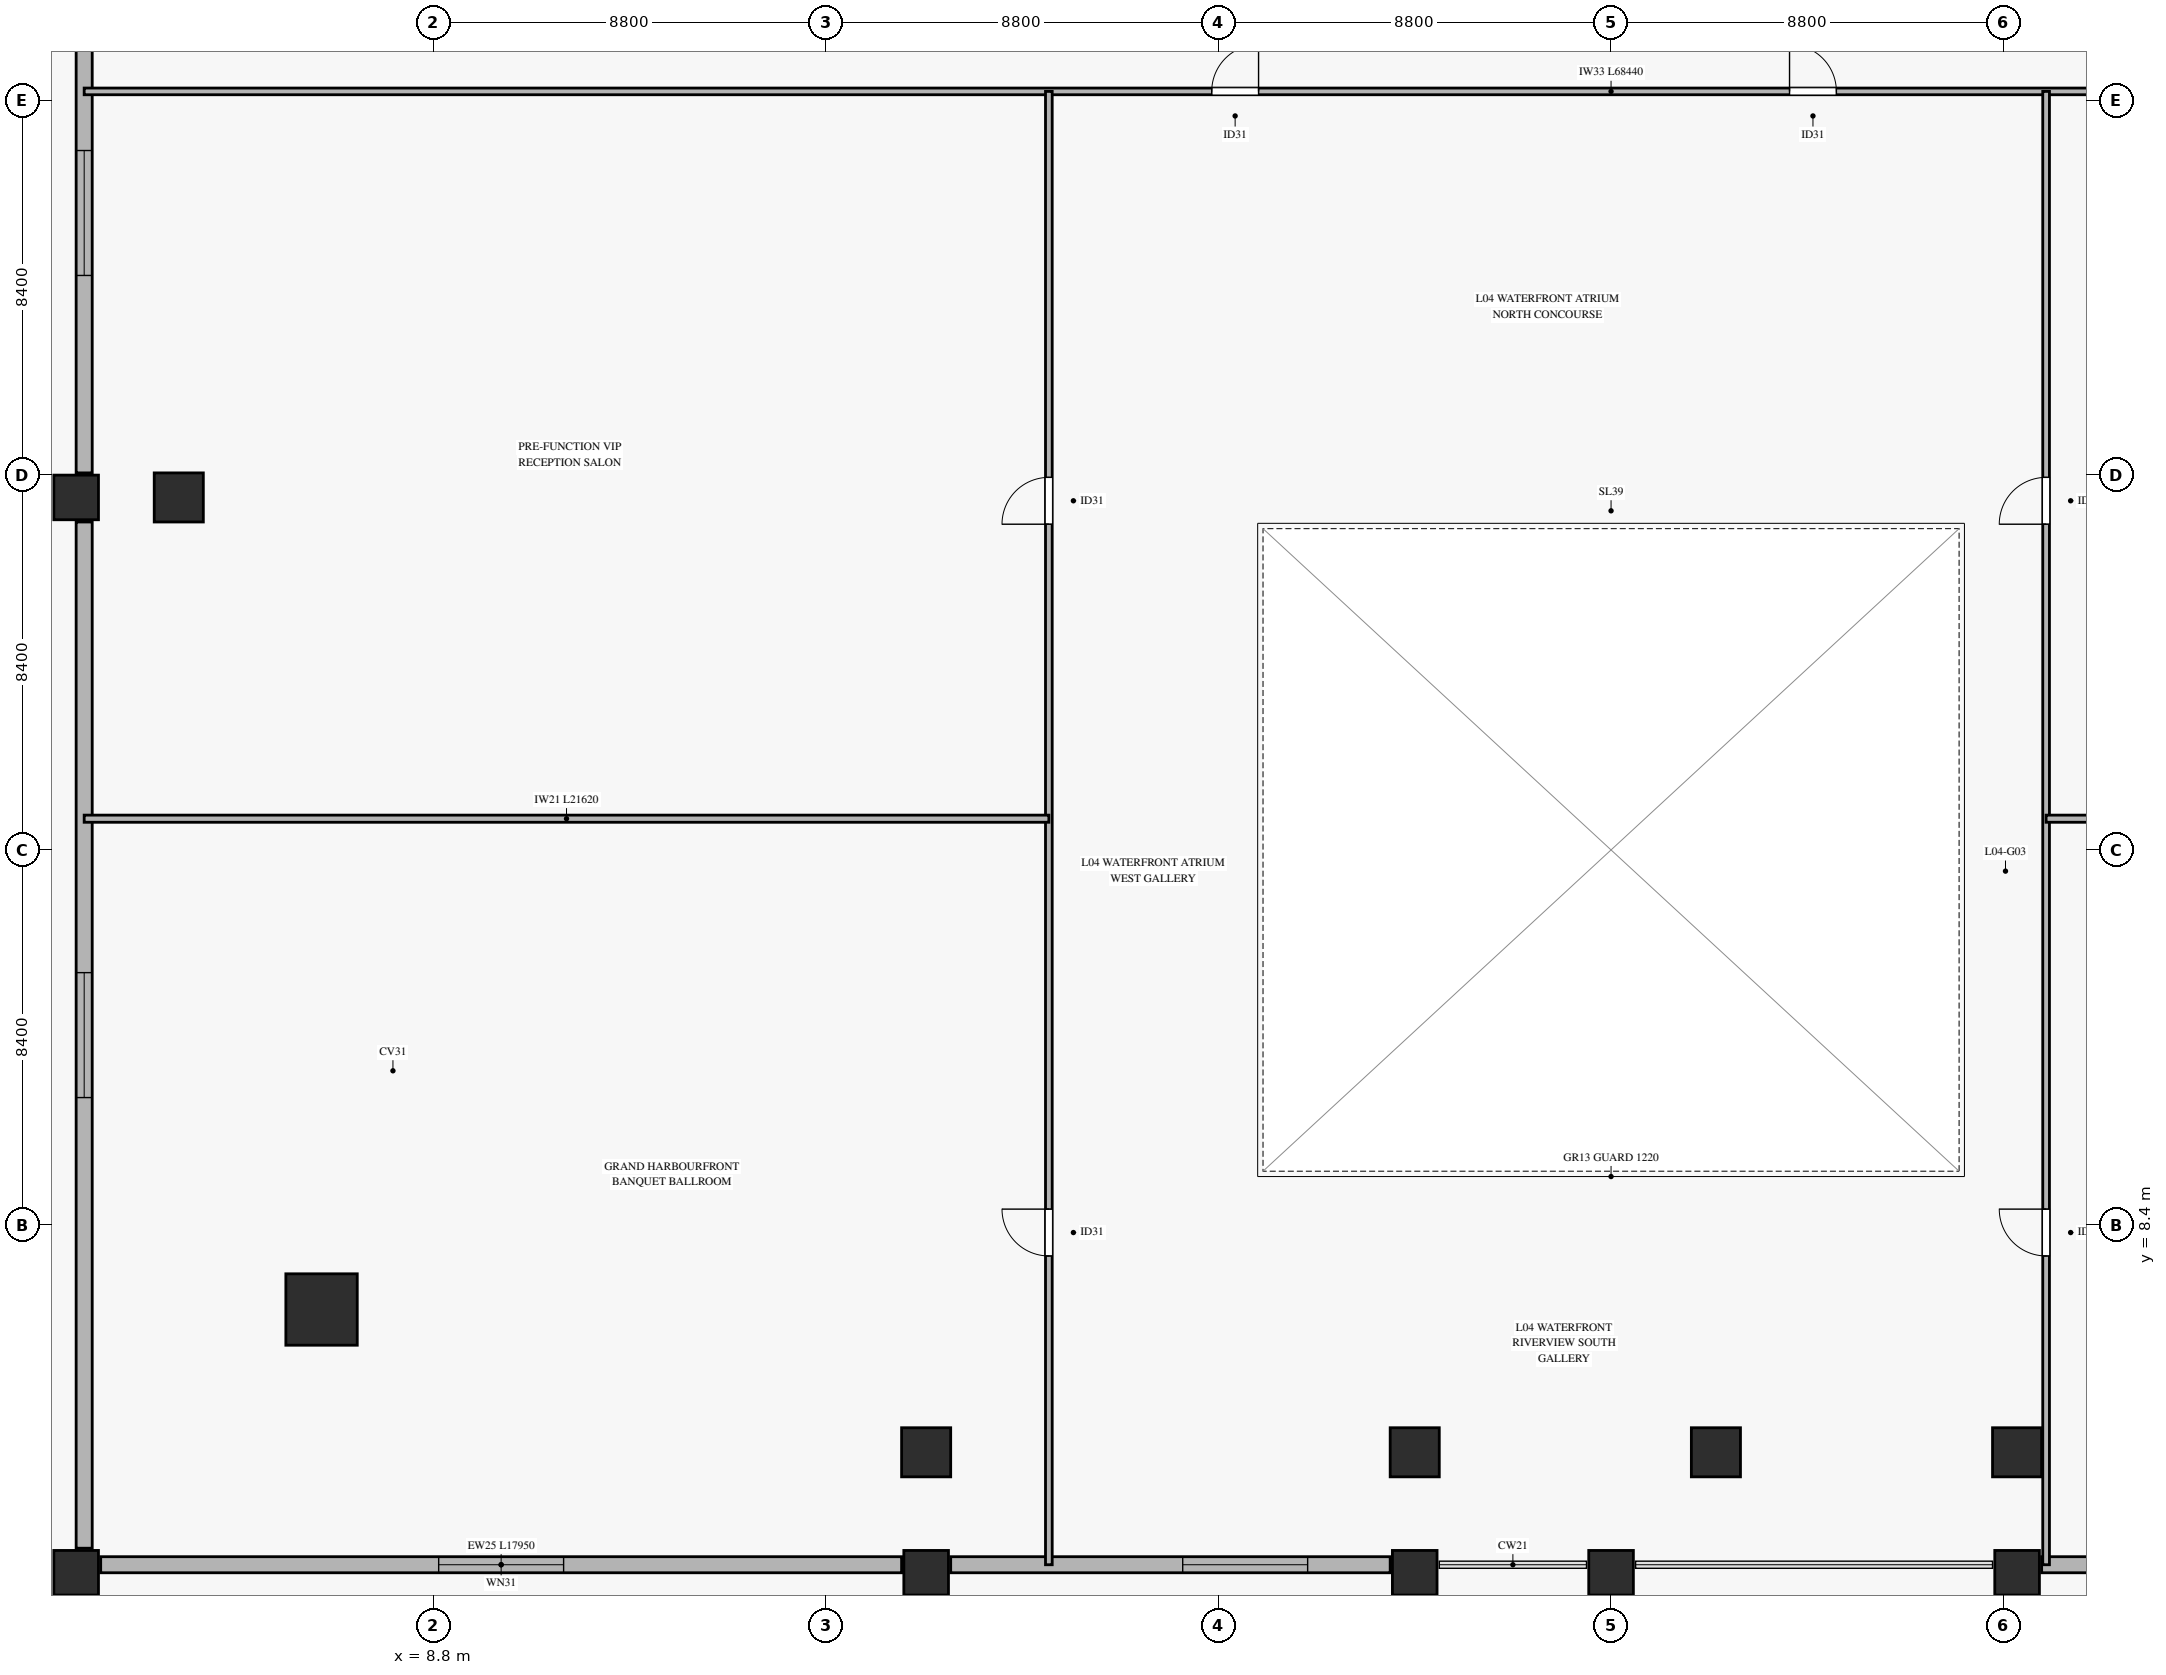
"""IFC4 building model, lengths in metres.
Left out: names, types, materials, properties, quantities, classifications, styles, units other than length and angle.
Written with IfcOpenShell. Run it as: python <this file> out.ifc"""

import sys

from ifc_helpers import new_model, si_unit, direction, frame, frame_2d, origin, origin_2d, place, context, subcontext, project, spatial, rectangle, hollow_rectangle, extrude, source, transform, mapped, element, fill, save


model = new_model("IFC4")
c1 = context("Model", 3, precision=1e-05, world=origin(), true_north=direction((0.0, 1.0)))
c2 = subcontext(c1, "Body", "Model", "MODEL_VIEW")
j1 = project(units=[si_unit("LENGTHUNIT", "METRE"), si_unit("PLANEANGLEUNIT", "RADIAN")], contexts=[c1])
p1 = place(None, origin())
s1 = spatial("IfcSite", under=j1, at=p1, CompositionType="ELEMENT")
p2 = place(p1, origin())
s2 = spatial("IfcBuilding", under=s1, at=p2, CompositionType="ELEMENT")
p3 = place(p2, frame((0.0, 0.0, 15.2)))
s3 = spatial("IfcBuildingStorey", under=s2, at=p3, CompositionType="ELEMENT", Elevation=15.2)
m1 = source(origin(), c2, "Body", "SweptSolid", [
    extrude(hollow_rectangle(XDim=1.6, YDim=1.6, WallThickness=0.075, at=origin_2d()), origin(), (0.0, 0.0, 1.0), 4.65),
])
p4 = place(p3, frame((6.3, 6.5, 0.0), z_axis=(0.0, 0.0, 1.0), x_axis=(1.0, 0.0, 0.0)))
e1 = element("IfcColumn", 1, at=p4, inside=s3, PredefinedType="COLUMN", context=c2, shape_type="MappedRepresentation", body=[
    mapped(m1, transform((0.0, 0.0, 0.0), x_axis=(1.0, 0.0, 0.0), y_axis=(0.0, 1.0, 0.0), z_axis=(0.0, 0.0, 1.0), scale=1.0)),
])
m2 = source(origin(), c2, "Body", "SweptSolid", [
    extrude(hollow_rectangle(XDim=1.1, YDim=1.1, WallThickness=0.05, at=origin_2d()), origin(), (0.0, 0.0, 1.0), 4.65),
])
for number, where, z_axis, x_axis in (
    (2, (19.85, 3.3, 0.0), (0.0, 0.0, 1.0), (1.0, 0.0, 0.0)),
    (3, (30.8, 3.3, 0.0), (0.0, 0.0, 1.0), (1.0, 0.0, 0.0)),
    (4, (37.55, 3.3, 0.0), (0.0, 0.0, 1.0), (1.0, 0.0, 0.0)),
    (5, (44.3, 3.3, 0.0), (0.0, 0.0, 1.0), (1.0, 0.0, 0.0)),
    (6, (3.1, 24.7, 0.0), (0.0, 0.0, 1.0), (1.0, 0.0, 0.0)),
):
    element("IfcColumn", number, at=place(p3, frame(where, z_axis=z_axis, x_axis=x_axis)), inside=s3, PredefinedType="COLUMN", context=c2, shape_type="MappedRepresentation", body=[
        mapped(m2, transform((0.0, 0.0, 0.0), x_axis=(1.0, 0.0, 0.0), y_axis=(0.0, 1.0, 0.0), z_axis=(0.0, 0.0, 1.0), scale=1.0)),
    ])
m3 = source(origin(), c2, "Body", "SweptSolid", [
    extrude(hollow_rectangle(XDim=1.0, YDim=1.0, WallThickness=0.045, at=origin_2d()), origin(), (0.0, 0.0, 1.0), 4.65),
])
for number, where, z_axis, x_axis in (
    (7, (0.8, 0.6, 0.0), (0.0, 0.0, 1.0), (1.0, 0.0, 0.0)),
    (8, (19.85, 0.6, 0.0), (0.0, 0.0, 1.0), (1.0, 0.0, 0.0)),
    (9, (30.8, 0.6, 0.0), (0.0, 0.0, 1.0), (1.0, 0.0, 0.0)),
    (10, (35.2, 0.6, 0.0), (0.0, 0.0, 1.0), (1.0, 0.0, 0.0)),
    (11, (44.3, 0.6, 0.0), (0.0, 0.0, 1.0), (1.0, 0.0, 0.0)),
    (12, (0.8, 24.7, 0.0), (0.0, 0.0, 1.0), (1.0, 0.0, 0.0)),
):
    element("IfcColumn", number, at=place(p3, frame(where, z_axis=z_axis, x_axis=x_axis)), inside=s3, PredefinedType="COLUMN", context=c2, shape_type="MappedRepresentation", body=[
        mapped(m3, transform((0.0, 0.0, 0.0), x_axis=(1.0, 0.0, 0.0), y_axis=(0.0, 1.0, 0.0), z_axis=(0.0, 0.0, 1.0), scale=1.0)),
    ])
p5 = place(p3, frame((1.35, 0.78, 0.0), z_axis=(0.0, 0.0, 1.0), x_axis=(1.0, 0.0, 0.0)))
e13 = element("IfcWall", 13, at=p5, inside=s3, PredefinedType="SOLIDWALL", context=c2, shape_type="SweptSolid", body=[
    extrude(rectangle(XDim=17.95, YDim=0.36, at=frame_2d((8.975, 0.0))), origin(), (0.0, 0.0, 1.0), 3.53),
])
p6 = place(p5, frame((7.575, 0.0, 0.72)))
e14 = element("IfcOpeningElement", 14, at=p6, cuts=e13, PredefinedType="OPENING", context=c2, shape_type="SweptSolid", body=[
    extrude(rectangle(XDim=2.8, YDim=2.0, at=frame_2d((1.4, 1.0))), frame((0.0, 0.19, 0.0), z_axis=(0.0, -1.0, 0.0), x_axis=(1.0, 0.0, 0.0)), (0.0, 0.0, 1.0), 0.38),
])
p7 = place(p3, frame((20.4, 0.78, 0.0), z_axis=(0.0, 0.0, 1.0), x_axis=(1.0, 0.0, 0.0)))
e15 = element("IfcWall", 15, at=p7, inside=s3, PredefinedType="SOLIDWALL", context=c2, shape_type="SweptSolid", body=[
    extrude(rectangle(XDim=9.85, YDim=0.36, at=frame_2d((4.925, 0.0))), origin(), (0.0, 0.0, 1.0), 3.53),
])
p8 = place(p7, frame((5.2, 0.0, 0.72)))
e16 = element("IfcOpeningElement", 16, at=p8, cuts=e15, PredefinedType="OPENING", context=c2, shape_type="SweptSolid", body=[
    extrude(rectangle(XDim=2.8, YDim=2.0, at=frame_2d((1.4, 1.0))), frame((0.0, 0.19, 0.0), z_axis=(0.0, -1.0, 0.0), x_axis=(1.0, 0.0, 0.0)), (0.0, 0.0, 1.0), 0.38),
])
p9 = place(p3, frame((44.85, 0.78, 0.0), z_axis=(0.0, 0.0, 1.0), x_axis=(1.0, 0.0, 0.0)))
e17 = element("IfcWall", 17, at=p9, inside=s3, PredefinedType="SOLIDWALL", context=c2, shape_type="SweptSolid", body=[
    extrude(rectangle(XDim=5.15, YDim=0.36, at=frame_2d((2.575, 0.0))), origin(), (0.0, 0.0, 1.0), 3.53),
])
p10 = place(p9, frame((1.5, 0.0, 0.72)))
e18 = element("IfcOpeningElement", 18, at=p10, cuts=e17, PredefinedType="OPENING", context=c2, shape_type="SweptSolid", body=[
    extrude(rectangle(XDim=2.8, YDim=2.0, at=frame_2d((1.4, 1.0))), frame((0.0, 0.19, 0.0), z_axis=(0.0, -1.0, 0.0), x_axis=(1.0, 0.0, 0.0)), (0.0, 0.0, 1.0), 0.38),
])
p11 = place(p3, frame((0.98, 1.15, 0.0), z_axis=(0.0, 0.0, 1.0), x_axis=(0.0, 1.0, 0.0)))
e19 = element("IfcWall", 19, at=p11, inside=s3, PredefinedType="SOLIDWALL", context=c2, shape_type="SweptSolid", body=[
    extrude(rectangle(XDim=23.0, YDim=0.36, at=frame_2d((11.5, 0.0))), origin(), (0.0, 0.0, 1.0), 3.53),
])
p12 = place(p11, frame((10.1, 0.0, 0.72)))
e20 = element("IfcOpeningElement", 20, at=p12, cuts=e19, PredefinedType="OPENING", context=c2, shape_type="SweptSolid", body=[
    extrude(rectangle(XDim=2.8, YDim=2.0, at=frame_2d((1.4, 1.0))), frame((0.0, 0.19, 0.0), z_axis=(0.0, -1.0, 0.0), x_axis=(1.0, 0.0, 0.0)), (0.0, 0.0, 1.0), 0.38),
])
p13 = place(p3, frame((0.98, 25.25, 0.0), z_axis=(0.0, 0.0, 1.0), x_axis=(0.0, 1.0, 0.0)))
e21 = element("IfcWall", 21, at=p13, inside=s3, PredefinedType="SOLIDWALL", context=c2, shape_type="SweptSolid", body=[
    extrude(rectangle(XDim=11.65, YDim=0.36, at=frame_2d((5.825, 0.0))), origin(), (0.0, 0.0, 1.0), 3.53),
])
p14 = place(p13, frame((4.425, 0.0, 0.72)))
e22 = element("IfcOpeningElement", 22, at=p14, cuts=e21, PredefinedType="OPENING", context=c2, shape_type="SweptSolid", body=[
    extrude(rectangle(XDim=2.8, YDim=2.0, at=frame_2d((1.4, 1.0))), frame((0.0, 0.19, 0.0), z_axis=(0.0, -1.0, 0.0), x_axis=(1.0, 0.0, 0.0)), (0.0, 0.0, 1.0), 0.38),
])
p15 = place(p3, frame((0.98, 33.8, 0.0), z_axis=(0.0, 0.0, 1.0), x_axis=(1.0, 0.0, 0.0)))
e23 = element("IfcWall", 23, at=p15, inside=s3, PredefinedType="PARTITIONING", context=c2, shape_type="SweptSolid", body=[
    extrude(rectangle(XDim=68.44, YDim=0.15, at=frame_2d((34.22, 0.0))), origin(), (0.0, 0.0, 1.0), 3.535),
])
p16 = place(p15, frame((25.27, 0.0, 0.0)))
e24 = element("IfcOpeningElement", 24, at=p16, cuts=e23, PredefinedType="OPENING", context=c2, shape_type="SweptSolid", body=[
    extrude(rectangle(XDim=1.05, YDim=2.15, at=frame_2d((0.525, 1.075))), frame((0.0, 0.085, 0.0), z_axis=(0.0, -1.0, 0.0), x_axis=(1.0, 0.0, 0.0)), (0.0, 0.0, 1.0), 0.17),
])
p17 = place(p15, frame((38.22, 0.0, 0.0)))
e25 = element("IfcOpeningElement", 25, at=p17, cuts=e23, PredefinedType="OPENING", context=c2, shape_type="SweptSolid", body=[
    extrude(rectangle(XDim=1.05, YDim=2.15, at=frame_2d((0.525, 1.075))), frame((0.0, 0.085, 0.0), z_axis=(0.0, -1.0, 0.0), x_axis=(1.0, 0.0, 0.0)), (0.0, 0.0, 1.0), 0.17),
])
p18 = place(p3, frame((22.6, 0.78, 0.0), z_axis=(0.0, 0.0, 1.0), x_axis=(0.0, 1.0, 0.0)))
e26 = element("IfcWall", 26, at=p18, inside=s3, PredefinedType="PARTITIONING", context=c2, shape_type="SweptSolid", body=[
    extrude(rectangle(XDim=33.02, YDim=0.15, at=frame_2d((16.51, 0.0))), origin(), (0.0, 0.0, 1.0), 3.535),
])
p19 = place(p18, frame((6.92, 0.0, 0.0)))
e27 = element("IfcOpeningElement", 27, at=p19, cuts=e26, PredefinedType="OPENING", context=c2, shape_type="SweptSolid", body=[
    extrude(rectangle(XDim=1.05, YDim=2.15, at=frame_2d((0.525, 1.075))), frame((0.0, 0.085, 0.0), z_axis=(0.0, -1.0, 0.0), x_axis=(1.0, 0.0, 0.0)), (0.0, 0.0, 1.0), 0.17),
])
p20 = place(p18, frame((23.32, 0.0, 0.0)))
e28 = element("IfcOpeningElement", 28, at=p20, cuts=e26, PredefinedType="OPENING", context=c2, shape_type="SweptSolid", body=[
    extrude(rectangle(XDim=1.05, YDim=2.15, at=frame_2d((0.525, 1.075))), frame((0.0, 0.085, 0.0), z_axis=(0.0, -1.0, 0.0), x_axis=(1.0, 0.0, 0.0)), (0.0, 0.0, 1.0), 0.17),
])
p21 = place(p3, frame((44.95, 0.78, 0.0), z_axis=(0.0, 0.0, 1.0), x_axis=(0.0, 1.0, 0.0)))
e29 = element("IfcWall", 29, at=p21, inside=s3, PredefinedType="PARTITIONING", context=c2, shape_type="SweptSolid", body=[
    extrude(rectangle(XDim=33.02, YDim=0.15, at=frame_2d((16.51, 0.0))), origin(), (0.0, 0.0, 1.0), 3.535),
])
p22 = place(p21, frame((6.92, 0.0, 0.0)))
e30 = element("IfcOpeningElement", 30, at=p22, cuts=e29, PredefinedType="OPENING", context=c2, shape_type="SweptSolid", body=[
    extrude(rectangle(XDim=1.05, YDim=2.15, at=frame_2d((0.525, 1.075))), frame((0.0, 0.085, 0.0), z_axis=(0.0, -1.0, 0.0), x_axis=(1.0, 0.0, 0.0)), (0.0, 0.0, 1.0), 0.17),
])
p23 = place(p21, frame((23.32, 0.0, 0.0)))
e31 = element("IfcOpeningElement", 31, at=p23, cuts=e29, PredefinedType="OPENING", context=c2, shape_type="SweptSolid", body=[
    extrude(rectangle(XDim=1.05, YDim=2.15, at=frame_2d((0.525, 1.075))), frame((0.0, 0.085, 0.0), z_axis=(0.0, -1.0, 0.0), x_axis=(1.0, 0.0, 0.0)), (0.0, 0.0, 1.0), 0.17),
])
p24 = place(p3, frame((0.98, 17.5, 0.0), z_axis=(0.0, 0.0, 1.0), x_axis=(1.0, 0.0, 0.0)))
e32 = element("IfcWall", 32, at=p24, inside=s3, PredefinedType="PARTITIONING", context=c2, shape_type="SweptSolid", body=[
    extrude(rectangle(XDim=21.62, YDim=0.16, at=frame_2d((10.81, 0.0))), origin(), (0.0, 0.0, 1.0), 3.535),
])
p25 = place(p3, frame((44.95, 17.5, 0.0), z_axis=(0.0, 0.0, 1.0), x_axis=(1.0, 0.0, 0.0)))
e33 = element("IfcWall", 33, at=p25, inside=s3, PredefinedType="PARTITIONING", context=c2, shape_type="SweptSolid", body=[
    extrude(rectangle(XDim=24.47, YDim=0.16, at=frame_2d((12.235, 0.0))), origin(), (0.0, 0.0, 1.0), 3.535),
])
m4 = source(origin(), c2, "Body", "SweptSolid", [
    extrude(rectangle(XDim=2.8, YDim=2.0, at=frame_2d((1.4, 1.0))), frame((0.0, 0.03, 0.0), z_axis=(0.0, -1.0, 0.0), x_axis=(1.0, 0.0, 0.0)), (0.0, 0.0, 1.0), 0.06),
])
p26 = place(p6, origin())
e34 = element("IfcWindow", 34, at=p26, inside=s3, PartitioningType="SINGLE_PANEL", PredefinedType="WINDOW", context=c2, shape_type="MappedRepresentation", body=[
    mapped(m4, transform((0.0, 0.0, 0.0), x_axis=(1.0, 0.0, 0.0), y_axis=(0.0, 1.0, 0.0), z_axis=(0.0, 0.0, 1.0), scale=1.0)),
])
fill(e14, e34)
p27 = place(p8, origin())
e35 = element("IfcWindow", 35, at=p27, inside=s3, PartitioningType="SINGLE_PANEL", PredefinedType="WINDOW", context=c2, shape_type="MappedRepresentation", body=[
    mapped(m4, transform((0.0, 0.0, 0.0), x_axis=(1.0, 0.0, 0.0), y_axis=(0.0, 1.0, 0.0), z_axis=(0.0, 0.0, 1.0), scale=1.0)),
])
fill(e16, e35)
p28 = place(p12, origin())
e36 = element("IfcWindow", 36, at=p28, inside=s3, PartitioningType="SINGLE_PANEL", PredefinedType="WINDOW", context=c2, shape_type="MappedRepresentation", body=[
    mapped(m4, transform((0.0, 0.0, 0.0), x_axis=(1.0, 0.0, 0.0), y_axis=(0.0, 1.0, 0.0), z_axis=(0.0, 0.0, 1.0), scale=1.0)),
])
fill(e20, e36)
p29 = place(p14, origin())
e37 = element("IfcWindow", 37, at=p29, inside=s3, PartitioningType="SINGLE_PANEL", PredefinedType="WINDOW", context=c2, shape_type="MappedRepresentation", body=[
    mapped(m4, transform((0.0, 0.0, 0.0), x_axis=(1.0, 0.0, 0.0), y_axis=(0.0, 1.0, 0.0), z_axis=(0.0, 0.0, 1.0), scale=1.0)),
])
fill(e22, e37)
m5 = source(origin(), c2, "Body", "SweptSolid", [
    extrude(rectangle(XDim=1.05, YDim=2.15, at=frame_2d((0.525, 1.075))), frame((0.0, 0.025, 0.0), z_axis=(0.0, -1.0, 0.0), x_axis=(1.0, 0.0, 0.0)), (0.0, 0.0, 1.0), 0.05),
])
p30 = place(p16, origin())
e38 = element("IfcDoor", 38, at=p30, inside=s3, OperationType="SINGLE_SWING_RIGHT", PredefinedType="DOOR", context=c2, shape_type="MappedRepresentation", body=[
    mapped(m5, transform((0.0, 0.0, 0.0), x_axis=(1.0, 0.0, 0.0), y_axis=(0.0, 1.0, 0.0), z_axis=(0.0, 0.0, 1.0), scale=1.0)),
])
fill(e24, e38)
p31 = place(p17, origin())
e39 = element("IfcDoor", 39, at=p31, inside=s3, OperationType="SINGLE_SWING_LEFT", PredefinedType="DOOR", context=c2, shape_type="MappedRepresentation", body=[
    mapped(m5, transform((0.0, 0.0, 0.0), x_axis=(1.0, 0.0, 0.0), y_axis=(0.0, 1.0, 0.0), z_axis=(0.0, 0.0, 1.0), scale=1.0)),
])
fill(e25, e39)
p32 = place(p19, origin())
e40 = element("IfcDoor", 40, at=p32, inside=s3, OperationType="SINGLE_SWING_RIGHT", PredefinedType="DOOR", context=c2, shape_type="MappedRepresentation", body=[
    mapped(m5, transform((0.0, 0.0, 0.0), x_axis=(1.0, 0.0, 0.0), y_axis=(0.0, 1.0, 0.0), z_axis=(0.0, 0.0, 1.0), scale=1.0)),
])
fill(e27, e40)
p33 = place(p20, origin())
e41 = element("IfcDoor", 41, at=p33, inside=s3, OperationType="SINGLE_SWING_LEFT", PredefinedType="DOOR", context=c2, shape_type="MappedRepresentation", body=[
    mapped(m5, transform((0.0, 0.0, 0.0), x_axis=(1.0, 0.0, 0.0), y_axis=(0.0, 1.0, 0.0), z_axis=(0.0, 0.0, 1.0), scale=1.0)),
])
fill(e28, e41)
p34 = place(p22, origin())
e42 = element("IfcDoor", 42, at=p34, inside=s3, OperationType="SINGLE_SWING_RIGHT", PredefinedType="DOOR", context=c2, shape_type="MappedRepresentation", body=[
    mapped(m5, transform((0.0, 0.0, 0.0), x_axis=(1.0, 0.0, 0.0), y_axis=(0.0, 1.0, 0.0), z_axis=(0.0, 0.0, 1.0), scale=1.0)),
])
fill(e30, e42)
p35 = place(p23, origin())
e43 = element("IfcDoor", 43, at=p35, inside=s3, OperationType="SINGLE_SWING_LEFT", PredefinedType="DOOR", context=c2, shape_type="MappedRepresentation", body=[
    mapped(m5, transform((0.0, 0.0, 0.0), x_axis=(1.0, 0.0, 0.0), y_axis=(0.0, 1.0, 0.0), z_axis=(0.0, 0.0, 1.0), scale=1.0)),
])
fill(e31, e43)
save(model, sys.argv[1])
